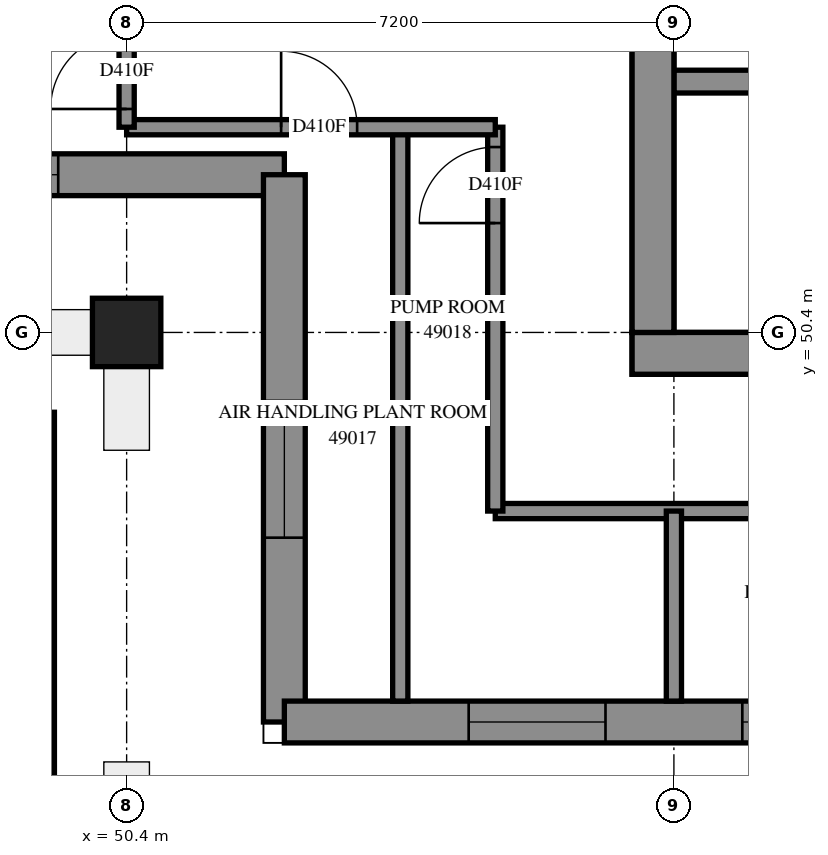
"""IFC4 building model, lengths in metres.
Left out: names, types, materials, properties, quantities, classifications, styles, units other than length and angle.
Written with IfcOpenShell. Run it as: python <this file> out.ifc"""

import sys

from ifc_helpers import new_model, si_unit, direction, frame, frame_2d, origin, origin_2d, place, context, subcontext, project, spatial, polyline, rectangle, outline, extrude, element, fill, save


model = new_model("IFC4")
c1 = context("Model", 3, precision=1e-05, world=origin(), true_north=direction((0.0, 1.0)))
c2 = subcontext(c1, "Body", "Model", "MODEL_VIEW")
j1 = project(units=[si_unit("LENGTHUNIT", "METRE"), si_unit("PLANEANGLEUNIT", "RADIAN")], contexts=[c1])
p1 = place(None, origin())
s1 = spatial("IfcSite", under=j1, at=p1, CompositionType="ELEMENT")
p2 = place(p1, origin())
s2 = spatial("IfcBuilding", under=s1, at=p2, CompositionType="ELEMENT")
p3 = place(p2, frame((0.0, 0.0, 180.4)))
s3 = spatial("IfcBuildingStorey", under=s2, at=p3, CompositionType="ELEMENT", Elevation=180.4)
p4 = place(p3, frame((50.4, 50.4, -0.3), z_axis=(0.0, 0.0, 1.0), x_axis=(1.0, 0.0, 0.0)))
e1 = element("IfcColumn", 1, at=p4, inside=s3, PredefinedType="COLUMN", context=c2, shape_type="SweptSolid", body=[
    extrude(rectangle(XDim=0.9, YDim=0.9, at=origin_2d()), origin(), (0.0, 0.0, 1.0), 5.0),
])
p5 = place(p3, frame((57.05, 50.125, -0.3), z_axis=(0.0, 0.0, 1.0), x_axis=(1.0, 0.0, 0.0)))
e2 = element("IfcWall", 2, at=p5, inside=s3, PredefinedType="SHEAR", context=c2, shape_type="SweptSolid", body=[
    extrude(rectangle(XDim=15.5, YDim=0.55, at=frame_2d((7.75, 0.0))), origin(), (0.0, 0.0, 1.0), 4.3),
])
p6 = place(p3, frame((57.325, 50.4, -0.3), z_axis=(0.0, 0.0, 1.0), x_axis=(0.0, 1.0, 0.0)))
e3 = element("IfcWall", 3, at=p6, inside=s3, PredefinedType="SHEAR", context=c2, shape_type="SweptSolid", body=[
    extrude(rectangle(XDim=14.4, YDim=0.55, at=frame_2d((7.2, 0.0))), origin(), (0.0, 0.0, 1.0), 4.3),
])
p7 = place(p6, frame((4.55, 0.0, 0.3)))
e4 = element("IfcOpeningElement", 4, at=p7, cuts=e3, PredefinedType="OPENING", context=c2, shape_type="SweptSolid", body=[
    extrude(rectangle(XDim=1.1, YDim=2.1, at=frame_2d((0.55, 1.05))), frame((0.0, 0.285, 0.0), z_axis=(0.0, -1.0, 0.0), x_axis=(1.0, 0.0, 0.0)), (0.0, 0.0, 1.0), 0.57),
])
p8 = place(p6, frame((11.35, 0.0, 0.3)))
e5 = element("IfcOpeningElement", 5, at=p8, cuts=e3, PredefinedType="OPENING", context=c2, shape_type="SweptSolid", body=[
    extrude(rectangle(XDim=1.1, YDim=2.1, at=frame_2d((0.55, 1.05))), frame((0.0, 0.285, 0.0), z_axis=(0.0, -1.0, 0.0), x_axis=(1.0, 0.0, 0.0)), (0.0, 0.0, 1.0), 0.57),
])
p9 = place(p3, frame((57.6, 53.7, 0.0), z_axis=(0.0, 0.0, 1.0), x_axis=(1.0, 0.0, 0.0)))
e6 = element("IfcWall", 6, at=p9, inside=s3, PredefinedType="SOLIDWALL", context=c2, shape_type="SweptSolid", body=[
    extrude(rectangle(XDim=14.4, YDim=0.3, at=frame_2d((7.2, 0.0))), origin(), (0.0, 0.0, 1.0), 4.7),
])
p10 = place(p9, frame((1.35, 0.0, 0.0)))
e7 = element("IfcOpeningElement", 7, at=p10, cuts=e6, PredefinedType="OPENING", context=c2, shape_type="SweptSolid", body=[
    extrude(rectangle(XDim=0.9, YDim=2.1, at=frame_2d((0.45, 1.05))), frame((0.0, 0.16, 0.0), z_axis=(0.0, -1.0, 0.0), x_axis=(1.0, 0.0, 0.0)), (0.0, 0.0, 1.0), 0.32),
])
p11 = place(p9, frame((4.95, 0.0, 0.0)))
e8 = element("IfcOpeningElement", 8, at=p11, cuts=e6, PredefinedType="OPENING", context=c2, shape_type="SweptSolid", body=[
    extrude(rectangle(XDim=0.9, YDim=2.1, at=frame_2d((0.45, 1.05))), frame((0.0, 0.16, 0.0), z_axis=(0.0, -1.0, 0.0), x_axis=(1.0, 0.0, 0.0)), (0.0, 0.0, 1.0), 0.32),
])
p12 = place(p9, frame((8.55, 0.0, 0.0)))
e9 = element("IfcOpeningElement", 9, at=p12, cuts=e6, PredefinedType="OPENING", context=c2, shape_type="SweptSolid", body=[
    extrude(rectangle(XDim=0.9, YDim=2.1, at=frame_2d((0.45, 1.05))), frame((0.0, 0.16, 0.0), z_axis=(0.0, -1.0, 0.0), x_axis=(1.0, 0.0, 0.0)), (0.0, 0.0, 1.0), 0.32),
])
p13 = place(p9, frame((12.05, 0.0, 0.0)))
e10 = element("IfcOpeningElement", 10, at=p13, cuts=e6, PredefinedType="OPENING", context=c2, shape_type="SweptSolid", body=[
    extrude(rectangle(XDim=1.1, YDim=2.1, at=frame_2d((0.55, 1.05))), frame((0.0, 0.16, 0.0), z_axis=(0.0, -1.0, 0.0), x_axis=(1.0, 0.0, 0.0)), (0.0, 0.0, 1.0), 0.32),
])
p14 = place(p3, frame((45.275, 52.475, 0.0), z_axis=(0.0, 0.0, 1.0), x_axis=(1.0, 0.0, 0.0)))
e11 = element("IfcWall", 11, at=p14, inside=s3, PredefinedType="SOLIDWALL", context=c2, shape_type="SweptSolid", body=[
    extrude(outline(polyline([(-0.275, -0.275), (6.925, -0.275), (7.475, 0.275), (0.275, 0.275), (-0.275, -0.275)])), origin(), (0.0, 0.0, 1.0), 4.7),
])
p15 = place(p14, frame((2.425, 0.0, 0.9)))
e12 = element("IfcOpeningElement", 12, at=p15, cuts=e11, PredefinedType="OPENING", context=c2, shape_type="SweptSolid", body=[
    extrude(rectangle(XDim=1.8, YDim=3.6, at=frame_2d((0.9, 1.8))), frame((0.0, 0.285, 0.0), z_axis=(0.0, -1.0, 0.0), x_axis=(1.0, 0.0, 0.0)), (0.0, 0.0, 1.0), 0.57),
])
p16 = place(p3, frame((52.475, 52.475, 0.0), z_axis=(0.0, 0.0, 1.0), x_axis=(0.0, -1.0, 0.0)))
e13 = element("IfcWall", 13, at=p16, inside=s3, PredefinedType="SOLIDWALL", context=c2, shape_type="SweptSolid", body=[
    extrude(outline(polyline([(0.275, -0.275), (7.475, -0.275), (6.925, 0.275), (-0.275, 0.275), (0.275, -0.275)])), origin(), (0.0, 0.0, 1.0), 4.7),
])
p17 = place(p16, frame((2.975, 0.0, 0.9)))
e14 = element("IfcOpeningElement", 14, at=p17, cuts=e13, PredefinedType="OPENING", context=c2, shape_type="SweptSolid", body=[
    extrude(rectangle(XDim=1.8, YDim=3.6, at=frame_2d((0.9, 1.8))), frame((0.0, 0.285, 0.0), z_axis=(0.0, -1.0, 0.0), x_axis=(1.0, 0.0, 0.0)), (0.0, 0.0, 1.0), 0.57),
])
p18 = place(p3, frame((52.475, 45.275, 0.0), z_axis=(0.0, 0.0, 1.0), x_axis=(1.0, 0.0, 0.0)))
e15 = element("IfcWall", 15, at=p18, inside=s3, PredefinedType="SOLIDWALL", context=c2, shape_type="SweptSolid", body=[
    extrude(outline(polyline([(-0.275, -0.275), (25.724, -0.275), (25.951, 0.275), (0.275, 0.275), (-0.275, -0.275)])), origin(), (0.0, 0.0, 1.0), 4.7),
])
p19 = place(p18, frame((2.425, 0.0, 0.9)))
e16 = element("IfcOpeningElement", 16, at=p19, cuts=e15, PredefinedType="OPENING", context=c2, shape_type="SweptSolid", body=[
    extrude(rectangle(XDim=1.8, YDim=3.6, at=frame_2d((0.9, 1.8))), frame((0.0, 0.285, 0.0), z_axis=(0.0, -1.0, 0.0), x_axis=(1.0, 0.0, 0.0)), (0.0, 0.0, 1.0), 0.57),
])
p20 = place(p18, frame((6.025, 0.0, 0.9)))
e17 = element("IfcOpeningElement", 17, at=p20, cuts=e15, PredefinedType="OPENING", context=c2, shape_type="SweptSolid", body=[
    extrude(rectangle(XDim=1.8, YDim=3.6, at=frame_2d((0.9, 1.8))), frame((0.0, 0.285, 0.0), z_axis=(0.0, -1.0, 0.0), x_axis=(1.0, 0.0, 0.0)), (0.0, 0.0, 1.0), 0.57),
])
p21 = place(p18, frame((9.625, 0.0, 0.9)))
e18 = element("IfcOpeningElement", 18, at=p21, cuts=e15, PredefinedType="OPENING", context=c2, shape_type="SweptSolid", body=[
    extrude(rectangle(XDim=1.8, YDim=3.6, at=frame_2d((0.9, 1.8))), frame((0.0, 0.285, 0.0), z_axis=(0.0, -1.0, 0.0), x_axis=(1.0, 0.0, 0.0)), (0.0, 0.0, 1.0), 0.57),
])
p22 = place(p18, frame((13.225, 0.0, 0.9)))
e19 = element("IfcOpeningElement", 19, at=p22, cuts=e15, PredefinedType="OPENING", context=c2, shape_type="SweptSolid", body=[
    extrude(rectangle(XDim=1.8, YDim=3.6, at=frame_2d((0.9, 1.8))), frame((0.0, 0.285, 0.0), z_axis=(0.0, -1.0, 0.0), x_axis=(1.0, 0.0, 0.0)), (0.0, 0.0, 1.0), 0.57),
])
p23 = place(p18, frame((16.825, 0.0, 0.9)))
e20 = element("IfcOpeningElement", 20, at=p23, cuts=e15, PredefinedType="OPENING", context=c2, shape_type="SweptSolid", body=[
    extrude(rectangle(XDim=1.8, YDim=3.6, at=frame_2d((0.9, 1.8))), frame((0.0, 0.285, 0.0), z_axis=(0.0, -1.0, 0.0), x_axis=(1.0, 0.0, 0.0)), (0.0, 0.0, 1.0), 0.57),
])
p24 = place(p18, frame((20.425, 0.0, 0.9)))
e21 = element("IfcOpeningElement", 21, at=p24, cuts=e15, PredefinedType="OPENING", context=c2, shape_type="SweptSolid", body=[
    extrude(rectangle(XDim=1.8, YDim=3.6, at=frame_2d((0.9, 1.8))), frame((0.0, 0.285, 0.0), z_axis=(0.0, -1.0, 0.0), x_axis=(1.0, 0.0, 0.0)), (0.0, 0.0, 1.0), 0.57),
])
p25 = place(p3, frame((42.15, 49.35, 0.0), z_axis=(0.0, 0.0, 1.0), x_axis=(1.0, 0.0, 0.0)))
e22 = element("IfcWall", 22, at=p25, inside=s3, PredefinedType="SOLIDWALL", context=c2, shape_type="SweptSolid", body=[
    extrude(outline(polyline([(-0.1, -0.1), (7.1, -0.1), (7.3, 0.1), (0.1, 0.1), (-0.1, -0.1)])), origin(), (0.0, 0.0, 1.0), 4.7),
])
p26 = place(p3, frame((49.35, 49.35, 0.0), z_axis=(0.0, 0.0, 1.0), x_axis=(0.0, -1.0, 0.0)))
e23 = element("IfcWall", 23, at=p26, inside=s3, PredefinedType="SOLIDWALL", context=c2, shape_type="SweptSolid", body=[
    extrude(outline(polyline([(0.1, -0.1), (7.3, -0.1), (7.1, 0.1), (-0.1, 0.1), (0.1, -0.1)])), origin(), (0.0, 0.0, 1.0), 4.7),
])
p27 = place(p3, frame((55.25, 48.05, 0.0), z_axis=(0.0, 0.0, 1.0), x_axis=(1.0, 0.0, 0.0)))
e24 = element("IfcWall", 24, at=p27, inside=s3, PredefinedType="PARTITIONING", context=c2, shape_type="SweptSolid", body=[
    extrude(rectangle(XDim=19.12, YDim=0.2, at=frame_2d((9.56, 0.0))), origin(), (0.0, 0.0, 1.0), 4.7),
])
p28 = place(p27, frame((4.383, 0.0, 0.0)))
e25 = element("IfcOpeningElement", 25, at=p28, cuts=e24, PredefinedType="OPENING", context=c2, shape_type="SweptSolid", body=[
    extrude(rectangle(XDim=1.0, YDim=2.1, at=frame_2d((0.5, 1.05))), frame((0.0, 0.11, 0.0), z_axis=(0.0, -1.0, 0.0), x_axis=(1.0, 0.0, 0.0)), (0.0, 0.0, 1.0), 0.22),
])
p29 = place(p27, frame((6.457, 0.0, 0.0)))
e26 = element("IfcOpeningElement", 26, at=p29, cuts=e24, PredefinedType="OPENING", context=c2, shape_type="SweptSolid", body=[
    extrude(rectangle(XDim=1.0, YDim=2.1, at=frame_2d((0.5, 1.05))), frame((0.0, 0.11, 0.0), z_axis=(0.0, -1.0, 0.0), x_axis=(1.0, 0.0, 0.0)), (0.0, 0.0, 1.0), 0.22),
])
p30 = place(p27, frame((11.582, 0.0, 0.0)))
e27 = element("IfcOpeningElement", 27, at=p30, cuts=e24, PredefinedType="OPENING", context=c2, shape_type="SweptSolid", body=[
    extrude(rectangle(XDim=1.0, YDim=2.1, at=frame_2d((0.5, 1.05))), frame((0.0, 0.11, 0.0), z_axis=(0.0, -1.0, 0.0), x_axis=(1.0, 0.0, 0.0)), (0.0, 0.0, 1.0), 0.22),
])
p31 = place(p27, frame((13.658, 0.0, 0.0)))
e28 = element("IfcOpeningElement", 28, at=p31, cuts=e24, PredefinedType="OPENING", context=c2, shape_type="SweptSolid", body=[
    extrude(rectangle(XDim=1.0, YDim=2.1, at=frame_2d((0.5, 1.05))), frame((0.0, 0.11, 0.0), z_axis=(0.0, -1.0, 0.0), x_axis=(1.0, 0.0, 0.0)), (0.0, 0.0, 1.0), 0.22),
])
p32 = place(p3, frame((54.0, 45.55, 0.0), z_axis=(0.0, 0.0, 1.0), x_axis=(0.0, 1.0, 0.0)))
e29 = element("IfcWall", 29, at=p32, inside=s3, PredefinedType="PARTITIONING", context=c2, shape_type="SweptSolid", body=[
    extrude(rectangle(XDim=7.55, YDim=0.2, at=frame_2d((3.775, 0.0))), origin(), (0.0, 0.0, 1.0), 4.7),
])
p33 = place(p3, frame((55.25, 48.05, 0.0), z_axis=(0.0, 0.0, 1.0), x_axis=(0.0, 1.0, 0.0)))
e30 = element("IfcWall", 30, at=p33, inside=s3, PredefinedType="PARTITIONING", context=c2, shape_type="SweptSolid", body=[
    extrude(rectangle(XDim=5.05, YDim=0.2, at=frame_2d((2.525, 0.0))), origin(), (0.0, 0.0, 1.0), 4.7),
])
p34 = place(p33, frame((3.789, 0.0, 0.0)))
e31 = element("IfcOpeningElement", 31, at=p34, cuts=e30, PredefinedType="OPENING", context=c2, shape_type="SweptSolid", body=[
    extrude(rectangle(XDim=1.0, YDim=2.1, at=frame_2d((0.5, 1.05))), frame((0.0, 0.11, 0.0), z_axis=(0.0, -1.0, 0.0), x_axis=(1.0, 0.0, 0.0)), (0.0, 0.0, 1.0), 0.22),
])
p35 = place(p3, frame((50.4, 53.1, 0.0), z_axis=(0.0, 0.0, 1.0), x_axis=(1.0, 0.0, 0.0)))
e32 = element("IfcWall", 32, at=p35, inside=s3, PredefinedType="PARTITIONING", context=c2, shape_type="SweptSolid", body=[
    extrude(rectangle(XDim=4.85, YDim=0.2, at=frame_2d((2.425, 0.0))), origin(), (0.0, 0.0, 1.0), 4.7),
])
p36 = place(p35, frame((2.033, 0.0, 0.0)))
e33 = element("IfcOpeningElement", 33, at=p36, cuts=e32, PredefinedType="OPENING", context=c2, shape_type="SweptSolid", body=[
    extrude(rectangle(XDim=1.0, YDim=2.1, at=frame_2d((0.5, 1.05))), frame((0.0, 0.11, 0.0), z_axis=(0.0, -1.0, 0.0), x_axis=(1.0, 0.0, 0.0)), (0.0, 0.0, 1.0), 0.22),
])
p37 = place(p3, frame((57.6, 45.55, 0.0), z_axis=(0.0, 0.0, 1.0), x_axis=(0.0, 1.0, 0.0)))
e34 = element("IfcWall", 34, at=p37, inside=s3, PredefinedType="PARTITIONING", context=c2, shape_type="SweptSolid", body=[
    extrude(rectangle(XDim=2.5, YDim=0.2, at=frame_2d((1.25, 0.0))), origin(), (0.0, 0.0, 1.0), 4.7),
])
p38 = place(p3, frame((50.4, 53.1, 0.0), z_axis=(0.0, 0.0, 1.0), x_axis=(0.0, 1.0, 0.0)))
e35 = element("IfcWall", 35, at=p38, inside=s3, PredefinedType="PARTITIONING", context=c2, shape_type="SweptSolid", body=[
    extrude(rectangle(XDim=1.8, YDim=0.2, at=frame_2d((0.9, 0.0))), origin(), (0.0, 0.0, 1.0), 4.7),
])
p39 = place(p38, frame((0.24, 0.0, 0.0)))
e36 = element("IfcOpeningElement", 36, at=p39, cuts=e35, PredefinedType="OPENING", context=c2, shape_type="SweptSolid", body=[
    extrude(rectangle(XDim=1.0, YDim=2.1, at=frame_2d((0.5, 1.05))), frame((0.0, 0.11, 0.0), z_axis=(0.0, -1.0, 0.0), x_axis=(1.0, 0.0, 0.0)), (0.0, 0.0, 1.0), 0.22),
])
p40 = place(p15, origin())
e37 = element("IfcWindow", 37, at=p40, inside=s3, PartitioningType="SINGLE_PANEL", PredefinedType="WINDOW", context=c2, shape_type="SweptSolid", body=[
    extrude(rectangle(XDim=1.8, YDim=3.6, at=frame_2d((0.9, 1.8))), frame((0.0, 0.155, 0.0), z_axis=(0.0, -1.0, 0.0), x_axis=(1.0, 0.0, 0.0)), (0.0, 0.0, 1.0), 0.06),
])
fill(e12, e37)
p41 = place(p17, origin())
e38 = element("IfcWindow", 38, at=p41, inside=s3, PartitioningType="SINGLE_PANEL", PredefinedType="WINDOW", context=c2, shape_type="SweptSolid", body=[
    extrude(rectangle(XDim=1.8, YDim=3.6, at=frame_2d((0.9, 1.8))), frame((0.0, 0.155, 0.0), z_axis=(0.0, -1.0, 0.0), x_axis=(1.0, 0.0, 0.0)), (0.0, 0.0, 1.0), 0.06),
])
fill(e14, e38)
p42 = place(p19, origin())
e39 = element("IfcWindow", 39, at=p42, inside=s3, PartitioningType="SINGLE_PANEL", PredefinedType="WINDOW", context=c2, shape_type="SweptSolid", body=[
    extrude(rectangle(XDim=1.8, YDim=3.6, at=frame_2d((0.9, 1.8))), frame((0.0, 0.155, 0.0), z_axis=(0.0, -1.0, 0.0), x_axis=(1.0, 0.0, 0.0)), (0.0, 0.0, 1.0), 0.06),
])
fill(e16, e39)
p43 = place(p20, origin())
e40 = element("IfcWindow", 40, at=p43, inside=s3, PartitioningType="SINGLE_PANEL", PredefinedType="WINDOW", context=c2, shape_type="SweptSolid", body=[
    extrude(rectangle(XDim=1.8, YDim=3.6, at=frame_2d((0.9, 1.8))), frame((0.0, 0.155, 0.0), z_axis=(0.0, -1.0, 0.0), x_axis=(1.0, 0.0, 0.0)), (0.0, 0.0, 1.0), 0.06),
])
fill(e17, e40)
p44 = place(p39, origin())
e41 = element("IfcDoor", 41, at=p44, inside=s3, OperationType="SINGLE_SWING_LEFT", PredefinedType="DOOR", context=c2, shape_type="SweptSolid", body=[
    extrude(rectangle(XDim=1.0, YDim=2.1, at=frame_2d((0.5, 1.05))), frame((0.0, 0.025, 0.0), z_axis=(0.0, -1.0, 0.0), x_axis=(1.0, 0.0, 0.0)), (0.0, 0.0, 1.0), 0.05),
])
fill(e36, e41)
p45 = place(p36, origin())
e42 = element("IfcDoor", 42, at=p45, inside=s3, OperationType="SINGLE_SWING_LEFT", PredefinedType="DOOR", context=c2, shape_type="SweptSolid", body=[
    extrude(rectangle(XDim=1.0, YDim=2.1, at=frame_2d((0.5, 1.05))), frame((0.0, 0.025, 0.0), z_axis=(0.0, -1.0, 0.0), x_axis=(1.0, 0.0, 0.0)), (0.0, 0.0, 1.0), 0.05),
])
fill(e33, e42)
p46 = place(p34, origin())
e43 = element("IfcDoor", 43, at=p46, inside=s3, OperationType="SINGLE_SWING_RIGHT", PredefinedType="DOOR", context=c2, shape_type="SweptSolid", body=[
    extrude(rectangle(XDim=1.0, YDim=2.1, at=frame_2d((0.5, 1.05))), frame((0.0, 0.025, 0.0), z_axis=(0.0, -1.0, 0.0), x_axis=(1.0, 0.0, 0.0)), (0.0, 0.0, 1.0), 0.05),
])
fill(e31, e43)
save(model, sys.argv[1])
